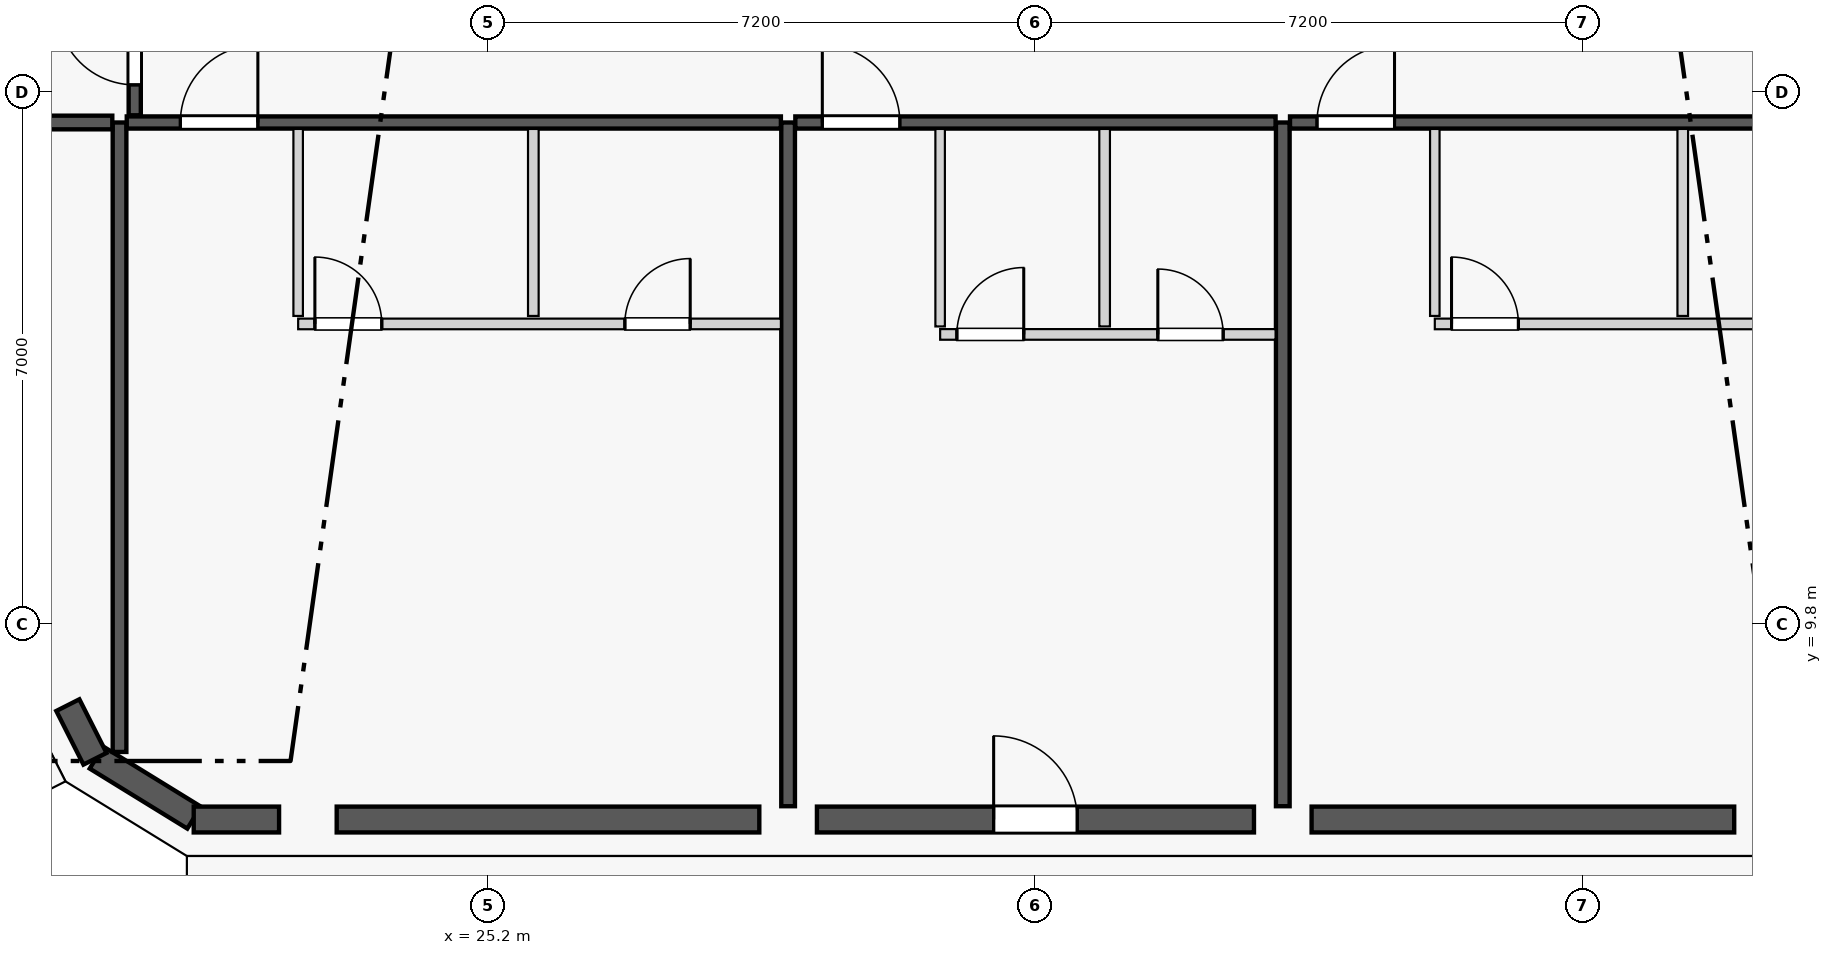
"""IFC4 building model, lengths in metres.
Left out: names, types, materials, properties, quantities, classifications, styles, units other than length and angle.
Written with IfcOpenShell. Run it as: python <this file> out.ifc"""

import sys

from ifc_helpers import new_model, si_unit, direction, frame, frame_2d, origin, origin_2d, place, context, subcontext, project, spatial, rectangle, extrude, element, fill, save


model = new_model("IFC4")
c1 = context("Model", 3, precision=1e-05, world=origin(), true_north=direction((0.0, 1.0)))
c2 = subcontext(c1, "Body", "Model", "MODEL_VIEW")
j1 = project(units=[si_unit("LENGTHUNIT", "METRE"), si_unit("PLANEANGLEUNIT", "RADIAN")], contexts=[c1])
p1 = place(None, origin())
s1 = spatial("IfcSite", under=j1, at=p1, CompositionType="ELEMENT")
p2 = place(p1, origin())
s2 = spatial("IfcBuilding", under=s1, at=p2, CompositionType="ELEMENT")
p3 = place(p2, frame((0.0, 0.0, 241.6)))
s3 = spatial("IfcBuildingStorey", under=s2, at=p3, CompositionType="ELEMENT", Elevation=241.6)
for number, where, z_axis, x_axis in (
    (1, (22.828, 7.239, 0.0), (0.0, 0.0, 1.0), (1.0, 0.0, 0.0)),
    (2, (29.146, 7.292, 0.0), (0.0, 0.0, 1.0), (1.0, 0.0, 0.0)),
    (3, (35.654, 7.292, 0.0), (0.0, 0.0, 1.0), (1.0, 0.0, 0.0)),
    (4, (41.972, 7.239, 0.0), (0.0, 0.0, 1.0), (1.0, 0.0, 0.0)),
    (5, (19.459, 9.191, 0.0), (0.0, 0.0, 1.0), (1.0, 0.0, 0.0)),
):
    element("IfcColumn", number, at=place(p3, frame(where, z_axis=z_axis, x_axis=x_axis)), inside=s3, PredefinedType="COLUMN", context=c2, shape_type="SweptSolid", body=[
        extrude(rectangle(XDim=0.75, YDim=0.75, at=origin_2d()), origin(), (0.0, 0.0, 1.0), 3.65),
    ])
p4 = place(p3, frame((21.143, 8.215, 0.0), z_axis=(0.0, 0.0, 1.0), x_axis=(0.865256437757, -0.501329529272, 0.0)))
e6 = element("IfcColumn", 6, at=p4, inside=s3, PredefinedType="PILASTER", context=c2, shape_type="SweptSolid", body=[
    extrude(rectangle(XDim=0.5, YDim=0.35, at=origin_2d()), origin(), (0.0, 0.0, 1.0), 3.65),
])
p5 = place(p3, frame((20.047, 8.045, 0.0), z_axis=(0.0, 0.0, 1.0), x_axis=(0.851680557619, -0.52406128246, 0.0)))
e7 = element("IfcWall", 7, at=p5, inside=s3, PredefinedType="STANDARD", context=c2, shape_type="SweptSolid", body=[
    extrude(rectangle(XDim=1.508, YDim=0.34, at=frame_2d((0.754, 0.0))), origin(), (0.0, 0.0, 1.0), 3.45),
])
p6 = place(p3, frame((21.326, 7.23, 0.0), z_axis=(0.0, 0.0, 1.0), x_axis=(1.0, 0.0, 0.0)))
e8 = element("IfcWall", 8, at=p6, inside=s3, PredefinedType="STANDARD", context=c2, shape_type="SweptSolid", body=[
    extrude(rectangle(XDim=1.123, YDim=0.34, at=frame_2d((0.562, 0.0))), origin(), (0.0, 0.0, 1.0), 3.45),
])
p7 = place(p3, frame((23.207, 7.23, 0.0), z_axis=(0.0, 0.0, 1.0), x_axis=(1.0, 0.0, 0.0)))
e9 = element("IfcWall", 9, at=p7, inside=s3, PredefinedType="STANDARD", context=c2, shape_type="SweptSolid", body=[
    extrude(rectangle(XDim=5.56, YDim=0.34, at=frame_2d((2.78, 0.0))), origin(), (0.0, 0.0, 1.0), 2.983),
])
p8 = place(p7, frame((2.08, 0.0, 0.75)))
e10 = element("IfcOpeningElement", 10, at=p8, cuts=e9, PredefinedType="OPENING", context=c2, shape_type="SweptSolid", body=[
    extrude(rectangle(XDim=1.4, YDim=2.05, at=frame_2d((0.7, 1.025))), frame((0.0, 0.18, 0.0), z_axis=(0.0, -1.0, 0.0), x_axis=(1.0, 0.0, 0.0)), (0.0, 0.0, 1.0), 0.36),
])
p9 = place(p3, frame((29.525, 7.23, 0.0), z_axis=(0.0, 0.0, 1.0), x_axis=(1.0, 0.0, 0.0)))
e11 = element("IfcWall", 11, at=p9, inside=s3, PredefinedType="STANDARD", context=c2, shape_type="SweptSolid", body=[
    extrude(rectangle(XDim=5.75, YDim=0.34, at=frame_2d((2.875, 0.0))), origin(), (0.0, 0.0, 1.0), 2.983),
])
p10 = place(p9, frame((2.325, 0.0, 0.0)))
e12 = element("IfcOpeningElement", 12, at=p10, cuts=e11, PredefinedType="OPENING", context=c2, shape_type="SweptSolid", body=[
    extrude(rectangle(XDim=1.1, YDim=2.25, at=frame_2d((0.55, 1.125))), frame((0.0, 0.18, 0.0), z_axis=(0.0, -1.0, 0.0), x_axis=(1.0, 0.0, 0.0)), (0.0, 0.0, 1.0), 0.36),
])
p11 = place(p3, frame((36.033, 7.23, 0.0), z_axis=(0.0, 0.0, 1.0), x_axis=(1.0, 0.0, 0.0)))
e13 = element("IfcWall", 13, at=p11, inside=s3, PredefinedType="STANDARD", context=c2, shape_type="SweptSolid", body=[
    extrude(rectangle(XDim=5.56, YDim=0.34, at=frame_2d((2.78, 0.0))), origin(), (0.0, 0.0, 1.0), 2.983),
])
p12 = place(p11, frame((2.23, 0.0, 0.75)))
e14 = element("IfcOpeningElement", 14, at=p12, cuts=e13, PredefinedType="OPENING", context=c2, shape_type="SweptSolid", body=[
    extrude(rectangle(XDim=1.1, YDim=2.0, at=frame_2d((0.55, 1.0))), frame((0.0, 0.18, 0.0), z_axis=(0.0, -1.0, 0.0), x_axis=(1.0, 0.0, 0.0)), (0.0, 0.0, 1.0), 0.36),
])
p13 = place(p3, frame((19.67, 8.735, 0.0), z_axis=(0.0, 0.0, 1.0), x_axis=(0.451404919072, -0.89231922485, 0.0)))
e15 = element("IfcWall", 15, at=p13, inside=s3, PredefinedType="STANDARD", context=c2, shape_type="SweptSolid", body=[
    extrude(rectangle(XDim=0.791, YDim=0.34, at=frame_2d((0.396, 0.0))), origin(), (0.0, 0.0, 1.0), 3.45),
])
p14 = place(p3, frame((20.35, 8.119, 0.0), z_axis=(0.0, 0.0, 1.0), x_axis=(0.0, 1.0, 0.0)))
e16 = element("IfcWall", 16, at=p14, inside=s3, PredefinedType="PARTITIONING", context=c2, shape_type="SweptSolid", body=[
    extrude(rectangle(XDim=8.281, YDim=0.18, at=frame_2d((4.141, 0.0))), origin(), (0.0, 0.0, 1.0), 3.45),
])
for number, where, z_axis, x_axis in (
    (17, (29.146, 7.405, 0.0), (0.0, 0.0, 1.0), (0.0, 1.0, 0.0)),
    (18, (35.654, 7.405, 0.0), (0.0, 0.0, 1.0), (0.0, 1.0, 0.0)),
):
    element("IfcWall", number, at=place(p3, frame(where, z_axis=z_axis, x_axis=x_axis)), inside=s3, PredefinedType="PARTITIONING", context=c2, shape_type="SweptSolid", body=[
        extrude(rectangle(XDim=8.995, YDim=0.18, at=frame_2d((4.498, 0.0))), origin(), (0.0, 0.0, 1.0), 2.907),
    ])
p15 = place(p3, frame((20.445, 16.4, 0.0), z_axis=(0.0, 0.0, 1.0), x_axis=(1.0, 0.0, 0.0)))
e19 = element("IfcWall", 19, at=p15, inside=s3, PredefinedType="PARTITIONING", context=c2, shape_type="SweptSolid", body=[
    extrude(rectangle(XDim=8.606, YDim=0.16, at=frame_2d((4.303, 0.0))), origin(), (0.0, 0.0, 1.0), 3.45),
])
p16 = place(p15, frame((0.705, 0.0, 0.0)))
e20 = element("IfcOpeningElement", 20, at=p16, cuts=e19, PredefinedType="OPENING", context=c2, shape_type="SweptSolid", body=[
    extrude(rectangle(XDim=1.02, YDim=2.25, at=frame_2d((0.51, 1.125))), frame((0.0, 0.09, 0.0), z_axis=(0.0, -1.0, 0.0), x_axis=(1.0, 0.0, 0.0)), (0.0, 0.0, 1.0), 0.18),
])
p17 = place(p3, frame((22.7, 13.855, 0.0), z_axis=(0.0, 0.0, 1.0), x_axis=(0.0, 1.0, 0.0)))
e21 = element("IfcWall", 21, at=p17, inside=s3, PredefinedType="PARTITIONING", context=c2, shape_type="SweptSolid", body=[
    extrude(rectangle(XDim=2.46, YDim=0.125, at=frame_2d((1.23, 0.0))), origin(), (0.0, 0.0, 1.0), 2.907),
])
p18 = place(p3, frame((22.7, 13.75, 0.0), z_axis=(0.0, 0.0, 1.0), x_axis=(1.0, 0.0, 0.0)))
e22 = element("IfcWall", 22, at=p18, inside=s3, PredefinedType="PLUMBINGWALL", context=c2, shape_type="SweptSolid", body=[
    extrude(rectangle(XDim=6.351, YDim=0.14, at=frame_2d((3.176, 0.0))), origin(), (0.0, 0.0, 1.0), 3.45),
])
p19 = place(p18, frame((4.298, 0.0, 0.0)))
e23 = element("IfcOpeningElement", 23, at=p19, cuts=e22, PredefinedType="OPENING", context=c2, shape_type="SweptSolid", body=[
    extrude(rectangle(XDim=0.86, YDim=2.1, at=frame_2d((0.43, 1.05))), frame((0.0, 0.08, 0.0), z_axis=(0.0, -1.0, 0.0), x_axis=(1.0, 0.0, 0.0)), (0.0, 0.0, 1.0), 0.16),
])
p20 = place(p18, frame((0.22, 0.0, 0.0)))
e24 = element("IfcOpeningElement", 24, at=p20, cuts=e22, PredefinedType="OPENING", context=c2, shape_type="SweptSolid", body=[
    extrude(rectangle(XDim=0.88, YDim=2.15, at=frame_2d((0.44, 1.075))), frame((0.0, 0.08, 0.0), z_axis=(0.0, -1.0, 0.0), x_axis=(1.0, 0.0, 0.0)), (0.0, 0.0, 1.0), 0.16),
])
p21 = place(p3, frame((25.794, 13.855, 0.0), z_axis=(0.0, 0.0, 1.0), x_axis=(0.0, 1.0, 0.0)))
e25 = element("IfcWall", 25, at=p21, inside=s3, PredefinedType="PLUMBINGWALL", context=c2, shape_type="SweptSolid", body=[
    extrude(rectangle(XDim=2.46, YDim=0.14, at=frame_2d((1.23, 0.0))), origin(), (0.0, 0.0, 1.0), 3.45),
])
p22 = place(p3, frame((29.241, 16.4, 0.0), z_axis=(0.0, 0.0, 1.0), x_axis=(1.0, 0.0, 0.0)))
e26 = element("IfcWall", 26, at=p22, inside=s3, PredefinedType="PARTITIONING", context=c2, shape_type="SweptSolid", body=[
    extrude(rectangle(XDim=6.318, YDim=0.16, at=frame_2d((3.159, 0.0))), origin(), (0.0, 0.0, 1.0), 3.45),
])
p23 = place(p22, frame((0.355, 0.0, 0.0)))
e27 = element("IfcOpeningElement", 27, at=p23, cuts=e26, PredefinedType="OPENING", context=c2, shape_type="SweptSolid", body=[
    extrude(rectangle(XDim=1.02, YDim=2.25, at=frame_2d((0.51, 1.125))), frame((0.0, 0.09, 0.0), z_axis=(0.0, -1.0, 0.0), x_axis=(1.0, 0.0, 0.0)), (0.0, 0.0, 1.0), 0.18),
])
p24 = place(p3, frame((31.146, 13.717, 0.0), z_axis=(0.0, 0.0, 1.0), x_axis=(0.0, 1.0, 0.0)))
e28 = element("IfcWall", 28, at=p24, inside=s3, PredefinedType="PARTITIONING", context=c2, shape_type="SweptSolid", body=[
    extrude(rectangle(XDim=2.598, YDim=0.125, at=frame_2d((1.299, 0.0))), origin(), (0.0, 0.0, 1.0), 3.45),
])
p25 = place(p3, frame((31.146, 13.612, 0.0), z_axis=(0.0, 0.0, 1.0), x_axis=(1.0, 0.0, 0.0)))
e29 = element("IfcWall", 29, at=p25, inside=s3, PredefinedType="PLUMBINGWALL", context=c2, shape_type="SweptSolid", body=[
    extrude(rectangle(XDim=4.413, YDim=0.14, at=frame_2d((2.207, 0.0))), origin(), (0.0, 0.0, 1.0), 3.45),
])
p26 = place(p25, frame((2.864, 0.0, 0.0)))
e30 = element("IfcOpeningElement", 30, at=p26, cuts=e29, PredefinedType="OPENING", context=c2, shape_type="SweptSolid", body=[
    extrude(rectangle(XDim=0.86, YDim=2.1, at=frame_2d((0.43, 1.05))), frame((0.0, 0.08, 0.0), z_axis=(0.0, -1.0, 0.0), x_axis=(1.0, 0.0, 0.0)), (0.0, 0.0, 1.0), 0.16),
])
p27 = place(p25, frame((0.22, 0.0, 0.0)))
e31 = element("IfcOpeningElement", 31, at=p27, cuts=e29, PredefinedType="OPENING", context=c2, shape_type="SweptSolid", body=[
    extrude(rectangle(XDim=0.88, YDim=2.15, at=frame_2d((0.44, 1.075))), frame((0.0, 0.08, 0.0), z_axis=(0.0, -1.0, 0.0), x_axis=(1.0, 0.0, 0.0)), (0.0, 0.0, 1.0), 0.16),
])
p28 = place(p3, frame((33.31, 13.717, 0.0), z_axis=(0.0, 0.0, 1.0), x_axis=(0.0, 1.0, 0.0)))
e32 = element("IfcWall", 32, at=p28, inside=s3, PredefinedType="PLUMBINGWALL", context=c2, shape_type="SweptSolid", body=[
    extrude(rectangle(XDim=2.598, YDim=0.14, at=frame_2d((1.299, 0.0))), origin(), (0.0, 0.0, 1.0), 3.45),
])
p29 = place(p3, frame((35.749, 16.4, 0.0), z_axis=(0.0, 0.0, 1.0), x_axis=(1.0, 0.0, 0.0)))
e33 = element("IfcWall", 33, at=p29, inside=s3, PredefinedType="PARTITIONING", context=c2, shape_type="SweptSolid", body=[
    extrude(rectangle(XDim=8.606, YDim=0.16, at=frame_2d((4.303, 0.0))), origin(), (0.0, 0.0, 1.0), 3.45),
])
p30 = place(p29, frame((0.355, 0.0, 0.0)))
e34 = element("IfcOpeningElement", 34, at=p30, cuts=e33, PredefinedType="OPENING", context=c2, shape_type="SweptSolid", body=[
    extrude(rectangle(XDim=1.02, YDim=2.25, at=frame_2d((0.51, 1.125))), frame((0.0, 0.09, 0.0), z_axis=(0.0, -1.0, 0.0), x_axis=(1.0, 0.0, 0.0)), (0.0, 0.0, 1.0), 0.18),
])
p31 = place(p3, frame((37.654, 13.855, 0.0), z_axis=(0.0, 0.0, 1.0), x_axis=(0.0, 1.0, 0.0)))
e35 = element("IfcWall", 35, at=p31, inside=s3, PredefinedType="PARTITIONING", context=c2, shape_type="SweptSolid", body=[
    extrude(rectangle(XDim=2.46, YDim=0.125, at=frame_2d((1.23, 0.0))), origin(), (0.0, 0.0, 1.0), 3.45),
])
p32 = place(p3, frame((37.654, 13.75, 0.0), z_axis=(0.0, 0.0, 1.0), x_axis=(1.0, 0.0, 0.0)))
e36 = element("IfcWall", 36, at=p32, inside=s3, PredefinedType="PLUMBINGWALL", context=c2, shape_type="SweptSolid", body=[
    extrude(rectangle(XDim=6.701, YDim=0.14, at=frame_2d((3.351, 0.0))), origin(), (0.0, 0.0, 1.0), 3.45),
])
p33 = place(p32, frame((4.556, 0.0, 0.0)))
e37 = element("IfcOpeningElement", 37, at=p33, cuts=e36, PredefinedType="OPENING", context=c2, shape_type="SweptSolid", body=[
    extrude(rectangle(XDim=0.86, YDim=2.1, at=frame_2d((0.43, 1.05))), frame((0.0, 0.08, 0.0), z_axis=(0.0, -1.0, 0.0), x_axis=(1.0, 0.0, 0.0)), (0.0, 0.0, 1.0), 0.16),
])
p34 = place(p32, frame((0.22, 0.0, 0.0)))
e38 = element("IfcOpeningElement", 38, at=p34, cuts=e36, PredefinedType="OPENING", context=c2, shape_type="SweptSolid", body=[
    extrude(rectangle(XDim=0.88, YDim=2.15, at=frame_2d((0.44, 1.075))), frame((0.0, 0.08, 0.0), z_axis=(0.0, -1.0, 0.0), x_axis=(1.0, 0.0, 0.0)), (0.0, 0.0, 1.0), 0.16),
])
p35 = place(p3, frame((40.916, 13.855, 0.0), z_axis=(0.0, 0.0, 1.0), x_axis=(0.0, 1.0, 0.0)))
e39 = element("IfcWall", 39, at=p35, inside=s3, PredefinedType="PLUMBINGWALL", context=c2, shape_type="SweptSolid", body=[
    extrude(rectangle(XDim=2.46, YDim=0.14, at=frame_2d((1.23, 0.0))), origin(), (0.0, 0.0, 1.0), 3.45),
])
p36 = place(p3, frame((16.034, 16.4, 0.0), z_axis=(0.0, 0.0, 1.0), x_axis=(1.0, 0.0, 0.0)))
e40 = element("IfcWall", 40, at=p36, inside=s3, PredefinedType="PARTITIONING", context=c2, shape_type="SweptSolid", body=[
    extrude(rectangle(XDim=4.221, YDim=0.18, at=frame_2d((2.11, 0.0))), origin(), (0.0, 0.0, 1.0), 3.45),
])
p37 = place(p3, frame((20.55, 16.495, 0.0), z_axis=(0.0, 0.0, 1.0), x_axis=(0.0, 1.0, 0.0)))
e41 = element("IfcWall", 41, at=p37, inside=s3, PredefinedType="PARTITIONING", context=c2, shape_type="SweptSolid", body=[
    extrude(rectangle(XDim=5.948, YDim=0.16, at=frame_2d((2.974, 0.0))), origin(), (0.0, 0.0, 1.0), 3.137),
])
p38 = place(p37, frame((0.4, 0.0, 0.0)))
e42 = element("IfcOpeningElement", 42, at=p38, cuts=e41, PredefinedType="OPENING", context=c2, shape_type="SweptSolid", body=[
    extrude(rectangle(XDim=1.02, YDim=2.25, at=frame_2d((0.51, 1.125))), frame((0.0, 0.09, 0.0), z_axis=(0.0, -1.0, 0.0), x_axis=(1.0, 0.0, 0.0)), (0.0, 0.0, 1.0), 0.18),
])
p39 = place(p8, origin())
e43 = element("IfcWindow", 43, at=p39, inside=s3, PartitioningType="SINGLE_PANEL", PredefinedType="WINDOW", context=c2, shape_type="SweptSolid", body=[
    extrude(rectangle(XDim=1.4, YDim=2.05, at=frame_2d((0.7, 1.025))), frame((0.0, 0.03, 0.0), z_axis=(0.0, -1.0, 0.0), x_axis=(1.0, 0.0, 0.0)), (0.0, 0.0, 1.0), 0.06),
])
fill(e10, e43)
p40 = place(p10, origin())
e44 = element("IfcDoor", 44, at=p40, inside=s3, OperationType="SINGLE_SWING_LEFT", PredefinedType="DOOR", context=c2, shape_type="SweptSolid", body=[
    extrude(rectangle(XDim=1.1, YDim=2.25, at=frame_2d((0.55, 1.125))), frame((0.0, 0.025, 0.0), z_axis=(0.0, -1.0, 0.0), x_axis=(1.0, 0.0, 0.0)), (0.0, 0.0, 1.0), 0.05),
])
fill(e12, e44)
p41 = place(p12, origin())
e45 = element("IfcWindow", 45, at=p41, inside=s3, PartitioningType="SINGLE_PANEL", PredefinedType="WINDOW", context=c2, shape_type="SweptSolid", body=[
    extrude(rectangle(XDim=1.1, YDim=2.0, at=frame_2d((0.55, 1.0))), frame((0.0, 0.03, 0.0), z_axis=(0.0, -1.0, 0.0), x_axis=(1.0, 0.0, 0.0)), (0.0, 0.0, 1.0), 0.06),
])
fill(e14, e45)
p42 = place(p19, origin())
e46 = element("IfcDoor", 46, at=p42, inside=s3, OperationType="SINGLE_SWING_RIGHT", PredefinedType="DOOR", context=c2, shape_type="SweptSolid", body=[
    extrude(rectangle(XDim=0.86, YDim=2.1, at=frame_2d((0.43, 1.05))), frame((0.0, 0.025, 0.0), z_axis=(0.0, -1.0, 0.0), x_axis=(1.0, 0.0, 0.0)), (0.0, 0.0, 1.0), 0.05),
])
fill(e23, e46)
p43 = place(p16, origin())
e47 = element("IfcDoor", 47, at=p43, inside=s3, OperationType="SINGLE_SWING_RIGHT", PredefinedType="DOOR", context=c2, shape_type="SweptSolid", body=[
    extrude(rectangle(XDim=1.02, YDim=2.25, at=frame_2d((0.51, 1.125))), frame((0.0, 0.025, 0.0), z_axis=(0.0, -1.0, 0.0), x_axis=(1.0, 0.0, 0.0)), (0.0, 0.0, 1.0), 0.05),
])
fill(e20, e47)
p44 = place(p20, origin())
e48 = element("IfcDoor", 48, at=p44, inside=s3, OperationType="SINGLE_SWING_LEFT", PredefinedType="DOOR", context=c2, shape_type="SweptSolid", body=[
    extrude(rectangle(XDim=0.88, YDim=2.15, at=frame_2d((0.44, 1.075))), frame((0.0, 0.025, 0.0), z_axis=(0.0, -1.0, 0.0), x_axis=(1.0, 0.0, 0.0)), (0.0, 0.0, 1.0), 0.05),
])
fill(e24, e48)
p45 = place(p26, origin())
e49 = element("IfcDoor", 49, at=p45, inside=s3, OperationType="SINGLE_SWING_LEFT", PredefinedType="DOOR", context=c2, shape_type="SweptSolid", body=[
    extrude(rectangle(XDim=0.86, YDim=2.1, at=frame_2d((0.43, 1.05))), frame((0.0, 0.025, 0.0), z_axis=(0.0, -1.0, 0.0), x_axis=(1.0, 0.0, 0.0)), (0.0, 0.0, 1.0), 0.05),
])
fill(e30, e49)
p46 = place(p23, origin())
e50 = element("IfcDoor", 50, at=p46, inside=s3, OperationType="SINGLE_SWING_LEFT", PredefinedType="DOOR", context=c2, shape_type="SweptSolid", body=[
    extrude(rectangle(XDim=1.02, YDim=2.25, at=frame_2d((0.51, 1.125))), frame((0.0, 0.025, 0.0), z_axis=(0.0, -1.0, 0.0), x_axis=(1.0, 0.0, 0.0)), (0.0, 0.0, 1.0), 0.05),
])
fill(e27, e50)
p47 = place(p27, origin())
e51 = element("IfcDoor", 51, at=p47, inside=s3, OperationType="SINGLE_SWING_RIGHT", PredefinedType="DOOR", context=c2, shape_type="SweptSolid", body=[
    extrude(rectangle(XDim=0.88, YDim=2.15, at=frame_2d((0.44, 1.075))), frame((0.0, 0.025, 0.0), z_axis=(0.0, -1.0, 0.0), x_axis=(1.0, 0.0, 0.0)), (0.0, 0.0, 1.0), 0.05),
])
fill(e31, e51)
p48 = place(p30, origin())
e52 = element("IfcDoor", 52, at=p48, inside=s3, OperationType="SINGLE_SWING_RIGHT", PredefinedType="DOOR", context=c2, shape_type="SweptSolid", body=[
    extrude(rectangle(XDim=1.02, YDim=2.25, at=frame_2d((0.51, 1.125))), frame((0.0, 0.025, 0.0), z_axis=(0.0, -1.0, 0.0), x_axis=(1.0, 0.0, 0.0)), (0.0, 0.0, 1.0), 0.05),
])
fill(e34, e52)
p49 = place(p34, origin())
e53 = element("IfcDoor", 53, at=p49, inside=s3, OperationType="SINGLE_SWING_LEFT", PredefinedType="DOOR", context=c2, shape_type="SweptSolid", body=[
    extrude(rectangle(XDim=0.88, YDim=2.15, at=frame_2d((0.44, 1.075))), frame((0.0, 0.025, 0.0), z_axis=(0.0, -1.0, 0.0), x_axis=(1.0, 0.0, 0.0)), (0.0, 0.0, 1.0), 0.05),
])
fill(e38, e53)
p50 = place(p38, origin())
e54 = element("IfcDoor", 54, at=p50, inside=s3, OperationType="SINGLE_SWING_RIGHT", PredefinedType="DOOR", context=c2, shape_type="SweptSolid", body=[
    extrude(rectangle(XDim=1.02, YDim=2.25, at=frame_2d((0.51, 1.125))), frame((0.0, 0.025, 0.0), z_axis=(0.0, -1.0, 0.0), x_axis=(1.0, 0.0, 0.0)), (0.0, 0.0, 1.0), 0.05),
])
fill(e42, e54)
save(model, sys.argv[1])
